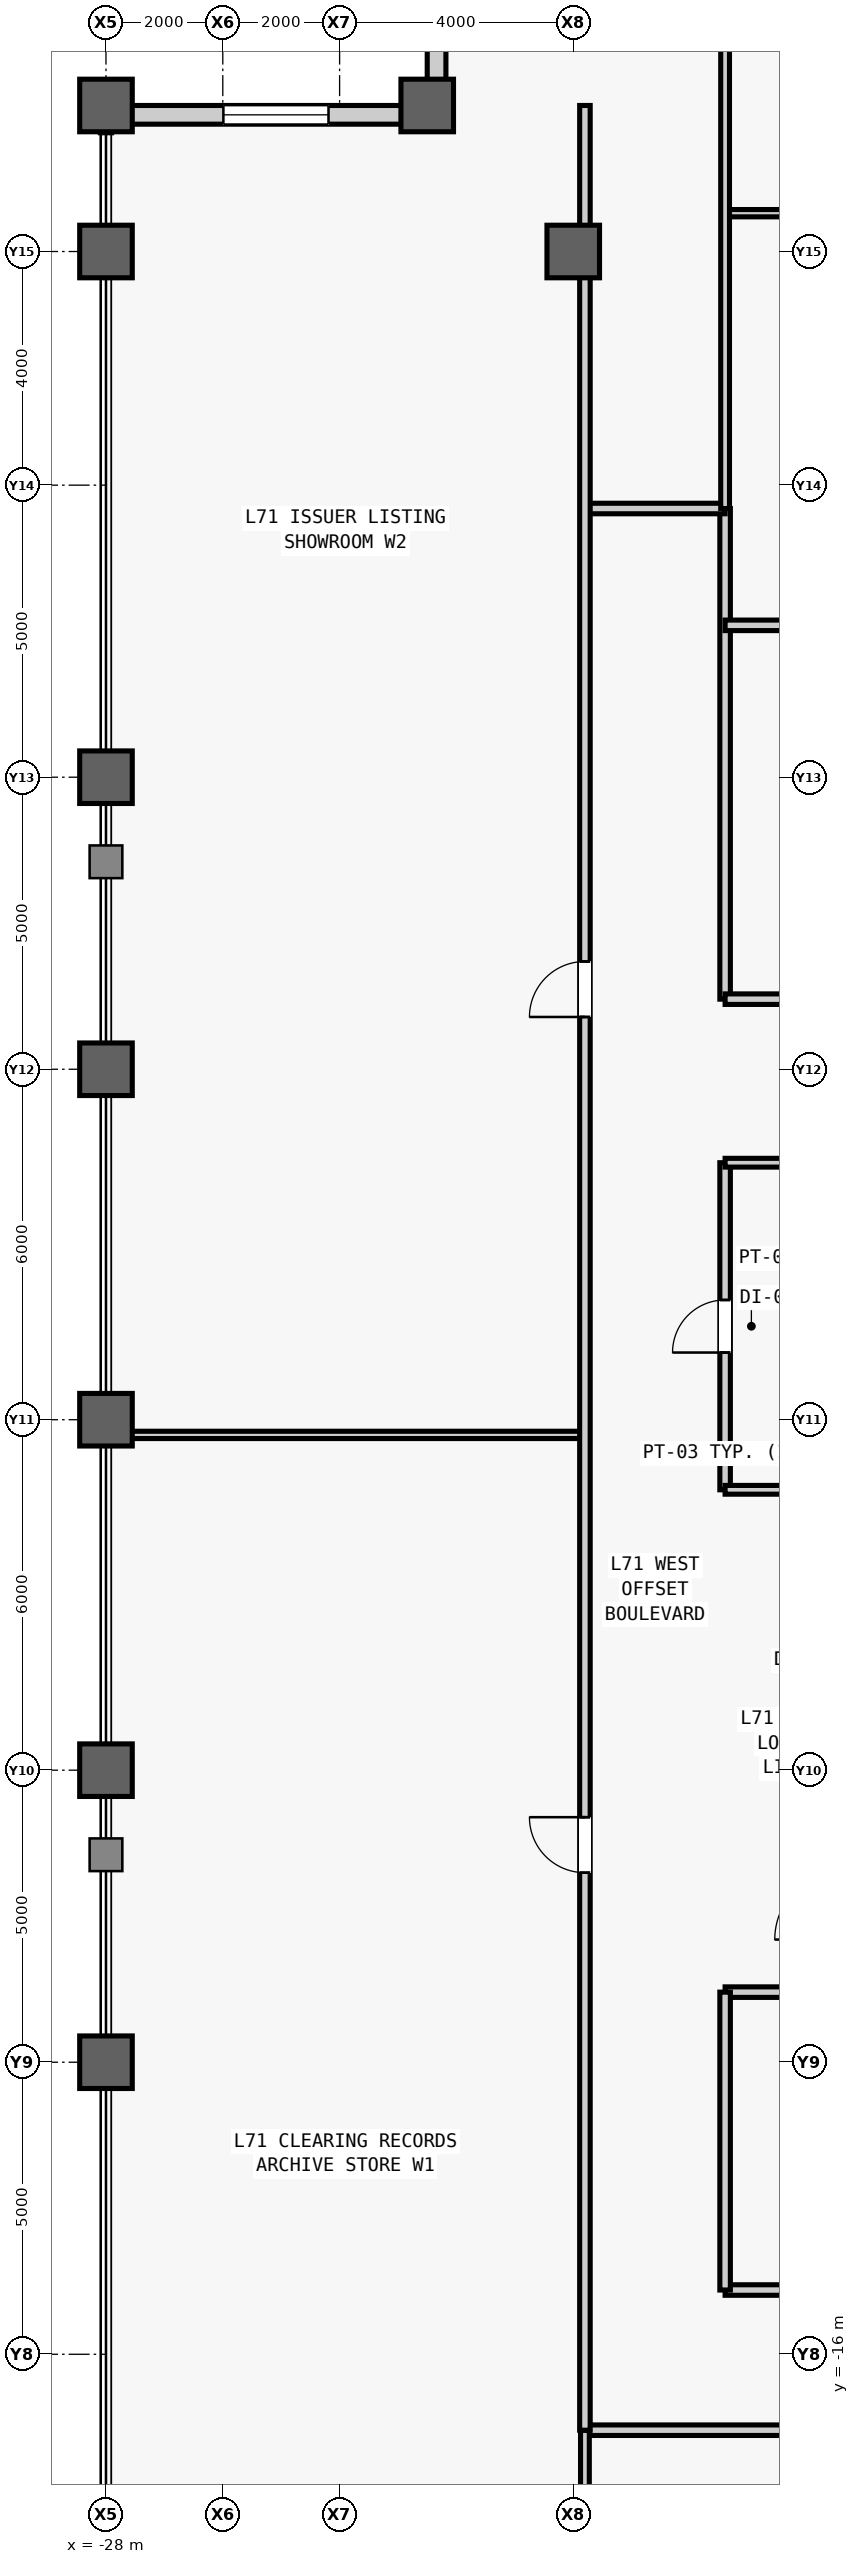
"""IFC4 building model, lengths in metres.
Left out: names, types, materials, properties, quantities, classifications, styles, units other than length and angle.
Written with IfcOpenShell. Run it as: python <this file> out.ifc"""

import sys

from ifc_helpers import new_model, si_unit, direction, frame, frame_2d, origin, origin_2d, place, context, subcontext, project, spatial, rectangle, hollow_rectangle, extrude, source, transform, mapped, element, fill, save


model = new_model("IFC4")
c1 = context("Model", 3, precision=1e-05, world=origin(), true_north=direction((0.0, 1.0)))
c2 = subcontext(c1, "Body", "Model", "MODEL_VIEW")
j1 = project(units=[si_unit("LENGTHUNIT", "METRE"), si_unit("PLANEANGLEUNIT", "RADIAN")], contexts=[c1])
p1 = place(None, origin())
s1 = spatial("IfcSite", under=j1, at=p1, CompositionType="ELEMENT")
p2 = place(p1, origin())
s2 = spatial("IfcBuilding", under=s1, at=p2, CompositionType="ELEMENT")
p3 = place(p2, frame((0.0, 0.0, 301.5)))
s3 = spatial("IfcBuildingStorey", under=s2, at=p3, CompositionType="ELEMENT", Elevation=301.5)
m1 = source(origin(), c2, "Body", "SweptSolid", [
    extrude(hollow_rectangle(XDim=0.9, YDim=0.9, WallThickness=0.05, at=origin_2d()), origin(), (0.0, 0.0, 1.0), 4.0),
])
for number, where, z_axis, x_axis in (
    (1, (-28.0, -11.0, 0.0), (0.0, 0.0, 1.0), (1.0, 0.0, 0.0)),
    (2, (-28.0, -6.0, 0.0), (0.0, 0.0, 1.0), (1.0, 0.0, 0.0)),
    (3, (-28.0, 0.0, 0.0), (0.0, 0.0, 1.0), (1.0, 0.0, 0.0)),
    (4, (-28.0, 6.0, 0.0), (0.0, 0.0, 1.0), (1.0, 0.0, 0.0)),
    (5, (-28.0, 11.0, 0.0), (0.0, 0.0, 1.0), (1.0, 0.0, 0.0)),
    (6, (-28.0, 20.0, 0.0), (0.0, 0.0, 1.0), (1.0, 0.0, 0.0)),
    (7, (-28.0, 22.5, 0.0), (0.0, 0.0, 1.0), (1.0, 0.0, 0.0)),
    (8, (-22.5, 22.5, 0.0), (0.0, 0.0, 1.0), (1.0, 0.0, 0.0)),
    (9, (-20.0, 20.0, 0.0), (0.0, 0.0, 1.0), (1.0, 0.0, 0.0)),
):
    element("IfcColumn", number, at=place(p3, frame(where, z_axis=z_axis, x_axis=x_axis)), inside=s3, PredefinedType="COLUMN", context=c2, shape_type="MappedRepresentation", body=[
        mapped(m1, transform((0.0, 0.0, 0.0), scale=1.0)),
    ])
m2 = source(origin(), c2, "Body", "SweptSolid", [
    extrude(rectangle(XDim=5.18, YDim=0.32, at=frame_2d((2.59, 0.0))), origin(), (0.0, 0.0, 1.0), 3.231),
])
p4 = place(p3, frame((-22.34, 22.5, 0.0), z_axis=(0.0, 0.0, 1.0), x_axis=(0.0, 1.0, 0.0)))
e10 = element("IfcWall", 10, at=p4, inside=s3, PredefinedType="STANDARD", context=c2, shape_type="MappedRepresentation", body=[
    mapped(m2, transform((0.0, 0.0, 0.0), scale=1.0)),
])
m3 = source(origin(), c2, "Body", "SweptSolid", [
    extrude(rectangle(XDim=1.8, YDim=2.4, at=frame_2d((0.9, 1.2))), frame((0.0, 0.17, 0.0), z_axis=(0.0, -1.0, 0.0), x_axis=(1.0, 0.0, 0.0)), (0.0, 0.0, 1.0), 0.34),
])
p5 = place(p4, frame((1.69, 0.0, 0.5)))
e11 = element("IfcOpeningElement", 11, at=p5, cuts=e10, PredefinedType="OPENING", context=c2, shape_type="MappedRepresentation", body=[
    mapped(m3, transform((0.0, 0.0, 0.0), scale=1.0)),
])
p6 = place(p3, frame((-22.5, 22.34, 0.0), z_axis=(0.0, 0.0, 1.0), x_axis=(-1.0, 0.0, 0.0)))
e12 = element("IfcWall", 12, at=p6, inside=s3, PredefinedType="STANDARD", context=c2, shape_type="MappedRepresentation", body=[
    mapped(m2, transform((0.0, 0.0, 0.0), scale=1.0)),
])
p7 = place(p6, frame((1.69, 0.0, 0.5)))
e13 = element("IfcOpeningElement", 13, at=p7, cuts=e12, PredefinedType="OPENING", context=c2, shape_type="MappedRepresentation", body=[
    mapped(m3, transform((0.0, 0.0, 0.0), scale=1.0)),
])
m4 = source(origin(), c2, "Body", "SweptSolid", [
    extrude(rectangle(XDim=5.6, YDim=0.18, at=frame_2d((2.8, 0.0))), origin(), (0.0, 0.0, 1.0), 3.78),
])
p8 = place(p3, frame((-17.4, -1.2, 0.0), z_axis=(0.0, 0.0, 1.0), x_axis=(0.0, 1.0, 0.0)))
e14 = element("IfcWall", 14, at=p8, inside=s3, PredefinedType="PARTITIONING", context=c2, shape_type="MappedRepresentation", body=[
    mapped(m4, transform((0.0, 0.0, 0.0), scale=1.0)),
])
m5 = source(origin(), c2, "Body", "SweptSolid", [
    extrude(rectangle(XDim=0.9, YDim=2.15, at=frame_2d((0.45, 1.075))), frame((0.0, 0.1, 0.0), z_axis=(0.0, -1.0, 0.0), x_axis=(1.0, 0.0, 0.0)), (0.0, 0.0, 1.0), 0.2),
])
p9 = place(p8, frame((2.35, 0.0, 0.0)))
e15 = element("IfcOpeningElement", 15, at=p9, cuts=e14, PredefinedType="OPENING", context=c2, shape_type="MappedRepresentation", body=[
    mapped(m5, transform((0.0, 0.0, 0.0), scale=1.0)),
])
m6 = source(origin(), c2, "Body", "SweptSolid", [
    extrude(rectangle(XDim=2.05, YDim=0.15, at=frame_2d((1.025, 0.0))), origin(), (0.0, 0.0, 1.0), 3.78),
])
for number, where, z_axis, x_axis in (
    (16, (-17.4, -1.2, 0.0), (0.0, 0.0, 1.0), (1.0, 0.0, 0.0)),
    (17, (-17.4, 4.4, 0.0), (0.0, 0.0, 1.0), (1.0, 0.0, 0.0)),
):
    element("IfcWall", number, at=place(p3, frame(where, z_axis=z_axis, x_axis=x_axis)), inside=s3, PredefinedType="PARTITIONING", context=c2, shape_type="MappedRepresentation", body=[
        mapped(m6, transform((0.0, 0.0, 0.0), scale=1.0)),
    ])
m7 = source(origin(), c2, "Body", "SweptSolid", [
    extrude(rectangle(XDim=2.05, YDim=0.18, at=frame_2d((1.025, 0.0))), origin(), (0.0, 0.0, 1.0), 3.78),
])
p10 = place(p3, frame((-17.4, -9.8, 0.0), z_axis=(0.0, 0.0, 1.0), x_axis=(1.0, 0.0, 0.0)))
e18 = element("IfcWall", 18, at=p10, inside=s3, PredefinedType="PARTITIONING", context=c2, shape_type="MappedRepresentation", body=[
    mapped(m7, transform((0.0, 0.0, 0.0), scale=1.0)),
])
m8 = source(origin(), c2, "Body", "SweptSolid", [
    extrude(rectangle(XDim=8.4, YDim=0.18, at=frame_2d((4.2, 0.0))), origin(), (0.0, 0.0, 1.0), 3.78),
])
p11 = place(p3, frame((-17.4, 7.2, 0.0), z_axis=(0.0, 0.0, 1.0), x_axis=(0.0, 1.0, 0.0)))
e19 = element("IfcWall", 19, at=p11, inside=s3, PredefinedType="PARTITIONING", context=c2, shape_type="MappedRepresentation", body=[
    mapped(m8, transform((0.0, 0.0, 0.0), scale=1.0)),
])
p12 = place(p3, frame((-17.4, 7.2, 0.0), z_axis=(0.0, 0.0, 1.0), x_axis=(1.0, 0.0, 0.0)))
e20 = element("IfcWall", 20, at=p12, inside=s3, PredefinedType="PARTITIONING", context=c2, shape_type="MappedRepresentation", body=[
    mapped(m7, transform((0.0, 0.0, 0.0), scale=1.0)),
])
m9 = source(origin(), c2, "Body", "SweptSolid", [
    extrude(rectangle(XDim=16.1, YDim=0.18, at=frame_2d((8.05, 0.0))), origin(), (0.0, 0.0, 1.0), 3.78),
])
p13 = place(p3, frame((-17.4, -14.9, 0.0), z_axis=(0.0, 0.0, 1.0), x_axis=(1.0, 0.0, 0.0)))
e21 = element("IfcWall", 21, at=p13, inside=s3, PredefinedType="PARTITIONING", context=c2, shape_type="MappedRepresentation", body=[
    mapped(m9, transform((0.0, 0.0, 0.0), scale=1.0)),
])
p14 = place(p13, frame((8.95, 0.0, 0.0)))
e22 = element("IfcOpeningElement", 22, at=p14, cuts=e21, PredefinedType="OPENING", context=c2, shape_type="MappedRepresentation", body=[
    mapped(m5, transform((0.0, 0.0, 0.0), scale=1.0)),
])
m10 = source(origin(), c2, "Body", "SweptSolid", [
    extrude(rectangle(XDim=5.1, YDim=0.18, at=frame_2d((2.55, 0.0))), origin(), (0.0, 0.0, 1.0), 3.78),
])
p15 = place(p3, frame((-17.4, -14.9, 0.0), z_axis=(0.0, 0.0, 1.0), x_axis=(0.0, 1.0, 0.0)))
e23 = element("IfcWall", 23, at=p15, inside=s3, PredefinedType="PARTITIONING", context=c2, shape_type="MappedRepresentation", body=[
    mapped(m10, transform((0.0, 0.0, 0.0), scale=1.0)),
])
m11 = source(origin(), c2, "Body", "SweptSolid", [
    extrude(rectangle(XDim=2.4, YDim=0.18, at=frame_2d((1.2, 0.0))), origin(), (0.0, 0.0, 1.0), 3.78),
])
p16 = place(p3, frame((-19.8, 15.6, 0.0), z_axis=(0.0, 0.0, 1.0), x_axis=(1.0, 0.0, 0.0)))
e24 = element("IfcWall", 24, at=p16, inside=s3, PredefinedType="PARTITIONING", context=c2, shape_type="MappedRepresentation", body=[
    mapped(m11, transform((0.0, 0.0, 0.0), scale=1.0)),
])
m12 = source(origin(), c2, "Body", "SweptSolid", [
    extrude(rectangle(XDim=37.55, YDim=0.18, at=frame_2d((18.775, 0.0))), origin(), (0.0, 0.0, 1.0), 3.78),
])
p17 = place(p3, frame((-19.8, -17.3, 0.0), z_axis=(0.0, 0.0, 1.0), x_axis=(1.0, 0.0, 0.0)))
e25 = element("IfcWall", 25, at=p17, inside=s3, PredefinedType="PARTITIONING", context=c2, shape_type="MappedRepresentation", body=[
    mapped(m12, transform((0.0, 0.0, 0.0), scale=1.0)),
])
m13 = source(origin(), c2, "Body", "SweptSolid", [
    extrude(rectangle(XDim=1.05, YDim=2.2, at=frame_2d((0.525, 1.1))), frame((0.0, 0.1, 0.0), z_axis=(0.0, -1.0, 0.0), x_axis=(1.0, 0.0, 0.0)), (0.0, 0.0, 1.0), 0.2),
])
p18 = place(p17, frame((8.424, 0.0, 0.0)))
e26 = element("IfcOpeningElement", 26, at=p18, cuts=e25, PredefinedType="OPENING", context=c2, shape_type="MappedRepresentation", body=[
    mapped(m13, transform((0.0, 0.0, 0.0), scale=1.0)),
])
p19 = place(p17, frame((26.174, 0.0, 0.0)))
e27 = element("IfcOpeningElement", 27, at=p19, cuts=e25, PredefinedType="OPENING", context=c2, shape_type="MappedRepresentation", body=[
    mapped(m13, transform((0.0, 0.0, 0.0), scale=1.0)),
])
m14 = source(origin(), c2, "Body", "SweptSolid", [
    extrude(rectangle(XDim=10.7, YDim=0.15, at=frame_2d((5.35, 0.0))), origin(), (0.0, 0.0, 1.0), 3.164),
])
p20 = place(p3, frame((-19.8, -28.0, 0.0), z_axis=(0.0, 0.0, 1.0), x_axis=(0.0, 1.0, 0.0)))
e28 = element("IfcWall", 28, at=p20, inside=s3, PredefinedType="PARTITIONING", context=c2, shape_type="MappedRepresentation", body=[
    mapped(m14, transform((0.0, 0.0, 0.0), scale=1.0)),
])
m15 = source(origin(), c2, "Body", "SweptSolid", [
    extrude(rectangle(XDim=8.188, YDim=0.125, at=frame_2d((4.094, 0.0))), origin(), (0.0, 0.0, 1.0), 3.78),
])
p21 = place(p3, frame((-17.4, 20.656, 0.0), z_axis=(0.0, 0.0, 1.0), x_axis=(1.0, 0.0, 0.0)))
e29 = element("IfcWall", 29, at=p21, inside=s3, PredefinedType="PARTITIONING", context=c2, shape_type="MappedRepresentation", body=[
    mapped(m15, transform((0.0, 0.0, 0.0), scale=1.0)),
])
m16 = source(origin(), c2, "Body", "SweptSolid", [
    extrude(rectangle(XDim=0.95, YDim=2.15, at=frame_2d((0.475, 1.075))), frame((0.0, 0.073, 0.0), z_axis=(0.0, -1.0, 0.0), x_axis=(1.0, 0.0, 0.0)), (0.0, 0.0, 1.0), 0.145),
])
p22 = place(p21, frame((3.619, 0.0, 0.0)))
e30 = element("IfcOpeningElement", 30, at=p22, cuts=e29, PredefinedType="OPENING", context=c2, shape_type="MappedRepresentation", body=[
    mapped(m16, transform((0.0, 0.0, 0.0), scale=1.0)),
])
m17 = source(origin(), c2, "Body", "SweptSolid", [
    extrude(rectangle(XDim=32.75, YDim=0.18, at=frame_2d((16.375, 0.0))), origin(), (0.0, 0.0, 1.0), 3.78),
])
p23 = place(p3, frame((-17.4, 13.6, 0.0), z_axis=(0.0, 0.0, 1.0), x_axis=(1.0, 0.0, 0.0)))
e31 = element("IfcWall", 31, at=p23, inside=s3, PredefinedType="PARTITIONING", context=c2, shape_type="MappedRepresentation", body=[
    mapped(m17, transform((0.0, 0.0, 0.0), scale=1.0)),
])
p24 = place(p23, frame((24.603, 0.0, 0.0)))
e32 = element("IfcOpeningElement", 32, at=p24, cuts=e31, PredefinedType="OPENING", context=c2, shape_type="MappedRepresentation", body=[
    mapped(m13, transform((0.0, 0.0, 0.0), scale=1.0)),
])
p25 = place(p23, frame((28.802, 0.0, 0.0)))
e33 = element("IfcOpeningElement", 33, at=p25, cuts=e31, PredefinedType="OPENING", context=c2, shape_type="MappedRepresentation", body=[
    mapped(m13, transform((0.0, 0.0, 0.0), scale=1.0)),
])
m18 = source(origin(), c2, "Body", "SweptSolid", [
    extrude(rectangle(XDim=12.4, YDim=0.15, at=frame_2d((6.2, 0.0))), origin(), (0.0, 0.0, 1.0), 3.78),
])
p26 = place(p3, frame((-17.4, 15.6, 0.0), z_axis=(0.0, 0.0, 1.0), x_axis=(0.0, 1.0, 0.0)))
e34 = element("IfcWall", 34, at=p26, inside=s3, PredefinedType="PARTITIONING", context=c2, shape_type="MappedRepresentation", body=[
    mapped(m18, transform((0.0, 0.0, 0.0), scale=1.0)),
])
m19 = source(origin(), c2, "Body", "SweptSolid", [
    extrude(rectangle(XDim=8.2, YDim=0.125, at=frame_2d((4.1, 0.0))), origin(), (0.0, 0.0, 1.0), 3.085),
])
p27 = place(p3, frame((-28.0, -0.26, 0.0), z_axis=(0.0, 0.0, 1.0), x_axis=(1.0, 0.0, 0.0)))
e35 = element("IfcWall", 35, at=p27, inside=s3, PredefinedType="PARTITIONING", context=c2, shape_type="MappedRepresentation", body=[
    mapped(m19, transform((0.0, 0.0, 0.0), scale=1.0)),
])
m20 = source(origin(), c2, "Body", "SweptSolid", [
    extrude(rectangle(XDim=39.8, YDim=0.18, at=frame_2d((19.9, 0.0))), origin(), (0.0, 0.0, 1.0), 3.164),
])
p28 = place(p3, frame((-19.8, -17.3, 0.0), z_axis=(0.0, 0.0, 1.0), x_axis=(0.0, 1.0, 0.0)))
e36 = element("IfcWall", 36, at=p28, inside=s3, PredefinedType="PARTITIONING", context=c2, shape_type="MappedRepresentation", body=[
    mapped(m20, transform((0.0, 0.0, 0.0), scale=1.0)),
])
m21 = source(origin(), c2, "Body", "SweptSolid", [
    extrude(rectangle(XDim=0.95, YDim=2.15, at=frame_2d((0.475, 1.075))), frame((0.0, 0.1, 0.0), z_axis=(0.0, -1.0, 0.0), x_axis=(1.0, 0.0, 0.0)), (0.0, 0.0, 1.0), 0.2),
])
p29 = place(p28, frame((9.545, 0.0, 0.0)))
e37 = element("IfcOpeningElement", 37, at=p29, cuts=e36, PredefinedType="OPENING", context=c2, shape_type="MappedRepresentation", body=[
    mapped(m21, transform((0.0, 0.0, 0.0), scale=1.0)),
])
p30 = place(p28, frame((24.195, 0.0, 0.0)))
e38 = element("IfcOpeningElement", 38, at=p30, cuts=e36, PredefinedType="OPENING", context=c2, shape_type="MappedRepresentation", body=[
    mapped(m21, transform((0.0, 0.0, 0.0), scale=1.0)),
])
m22 = source(origin(), c2, "Body", "SweptSolid", [
    extrude(rectangle(XDim=1.8, YDim=2.4, at=frame_2d((0.9, 1.2))), frame((0.0, 0.03, 0.0), z_axis=(0.0, -1.0, 0.0), x_axis=(1.0, 0.0, 0.0)), (0.0, 0.0, 1.0), 0.06),
])
p31 = place(p7, origin())
e39 = element("IfcWindow", 39, at=p31, inside=s3, PartitioningType="SINGLE_PANEL", PredefinedType="WINDOW", context=c2, shape_type="MappedRepresentation", body=[
    mapped(m22, transform((0.0, 0.0, 0.0), scale=1.0)),
])
fill(e13, e39)
m23 = source(origin(), c2, "Body", "SweptSolid", [
    extrude(rectangle(XDim=0.9, YDim=2.15, at=frame_2d((0.45, 1.075))), frame((0.0, 0.025, 0.0), z_axis=(0.0, -1.0, 0.0), x_axis=(1.0, 0.0, 0.0)), (0.0, 0.0, 1.0), 0.05),
])
p32 = place(p9, origin())
e40 = element("IfcDoor", 40, at=p32, inside=s3, OperationType="SINGLE_SWING_LEFT", PredefinedType="DOOR", context=c2, shape_type="MappedRepresentation", body=[
    mapped(m23, transform((0.0, 0.0, 0.0), scale=1.0)),
])
fill(e15, e40)
m24 = source(origin(), c2, "Body", "SweptSolid", [
    extrude(rectangle(XDim=0.95, YDim=2.15, at=frame_2d((0.475, 1.075))), frame((0.0, 0.025, 0.0), z_axis=(0.0, -1.0, 0.0), x_axis=(1.0, 0.0, 0.0)), (0.0, 0.0, 1.0), 0.05),
])
p33 = place(p29, origin())
e41 = element("IfcDoor", 41, at=p33, inside=s3, OperationType="SINGLE_SWING_RIGHT", PredefinedType="DOOR", context=c2, shape_type="MappedRepresentation", body=[
    mapped(m24, transform((0.0, 0.0, 0.0), scale=1.0)),
])
fill(e37, e41)
p34 = place(p30, origin())
e42 = element("IfcDoor", 42, at=p34, inside=s3, OperationType="SINGLE_SWING_LEFT", PredefinedType="DOOR", context=c2, shape_type="MappedRepresentation", body=[
    mapped(m24, transform((0.0, 0.0, 0.0), scale=1.0)),
])
fill(e38, e42)
save(model, sys.argv[1])
